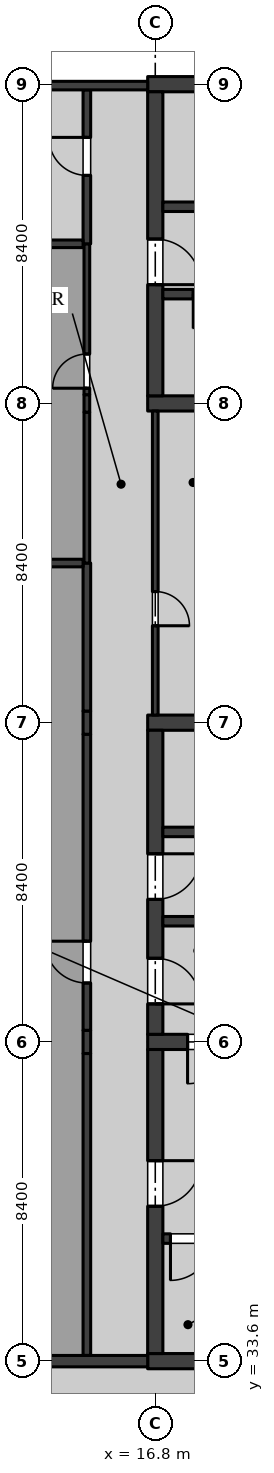
"""IFC4 building model, lengths in metres.
Left out: names, types, materials, properties, quantities, classifications, styles, units other than length and angle.
Written with IfcOpenShell. Run it as: python <this file> out.ifc"""

import sys

from ifc_helpers import new_model, si_unit, direction, frame, frame_2d, origin, place, context, subcontext, project, spatial, rectangle, extrude, element, fill, save


model = new_model("IFC4")
c1 = context("Model", 3, precision=1e-05, world=origin(), true_north=direction((0.0, 1.0)))
c2 = subcontext(c1, "Body", "Model", "MODEL_VIEW")
j1 = project(units=[si_unit("LENGTHUNIT", "METRE"), si_unit("PLANEANGLEUNIT", "RADIAN")], contexts=[c1])
p1 = place(None, origin())
s1 = spatial("IfcSite", under=j1, at=p1, CompositionType="ELEMENT")
p2 = place(p1, origin())
s2 = spatial("IfcBuilding", under=s1, at=p2, CompositionType="ELEMENT")
p3 = place(p2, frame((0.0, 0.0, 5.4)))
s3 = spatial("IfcBuildingStorey", under=s2, at=p3, CompositionType="ELEMENT", Elevation=5.4)
p4 = place(p3, frame((16.6, 42.0, 0.0), z_axis=(0.0, 0.0, 1.0), x_axis=(1.0, 0.0, 0.0)))
e1 = element("IfcWall", 1, at=p4, inside=s3, PredefinedType="SHEAR", context=c2, shape_type="SweptSolid", body=[
    extrude(rectangle(XDim=8.8, YDim=0.4, at=frame_2d((4.4, 0.0))), origin(), (0.0, 0.0, 1.0), 4.37),
])
p5 = place(p4, frame((1.05, 0.0, 0.0)))
e2 = element("IfcOpeningElement", 2, at=p5, cuts=e1, PredefinedType="OPENING", context=c2, shape_type="SweptSolid", body=[
    extrude(rectangle(XDim=1.1, YDim=2.1, at=frame_2d((0.55, 1.05))), frame((0.0, 0.21, 0.0), z_axis=(0.0, -1.0, 0.0), x_axis=(1.0, 0.0, 0.0)), (0.0, 0.0, 1.0), 0.42),
])
p6 = place(p3, frame((16.6, 50.4, 0.0), z_axis=(0.0, 0.0, 1.0), x_axis=(1.0, 0.0, 0.0)))
e3 = element("IfcWall", 3, at=p6, inside=s3, PredefinedType="SHEAR", context=c2, shape_type="SweptSolid", body=[
    extrude(rectangle(XDim=8.8, YDim=0.4, at=frame_2d((4.4, 0.0))), origin(), (0.0, 0.0, 1.0), 4.37),
])
p7 = place(p3, frame((16.8, 42.2, 0.0), z_axis=(0.0, 0.0, 1.0), x_axis=(0.0, 1.0, 0.0)))
e4 = element("IfcWall", 4, at=p7, inside=s3, PredefinedType="SHEAR", context=c2, shape_type="SweptSolid", body=[
    extrude(rectangle(XDim=8.0, YDim=0.4, at=frame_2d((4.0, 0.0))), origin(), (0.0, 0.0, 1.0), 4.37),
])
p8 = place(p7, frame((3.55, 0.0, 0.0)))
e5 = element("IfcOpeningElement", 5, at=p8, cuts=e4, PredefinedType="OPENING", context=c2, shape_type="SweptSolid", body=[
    extrude(rectangle(XDim=1.2, YDim=2.1, at=frame_2d((0.6, 1.05))), frame((0.0, 0.21, 0.0), z_axis=(0.0, -1.0, 0.0), x_axis=(1.0, 0.0, 0.0)), (0.0, 0.0, 1.0), 0.42),
])
p9 = place(p7, frame((0.8, 0.0, 0.0)))
e6 = element("IfcOpeningElement", 6, at=p9, cuts=e4, PredefinedType="OPENING", context=c2, shape_type="SweptSolid", body=[
    extrude(rectangle(XDim=1.2, YDim=2.1, at=frame_2d((0.6, 1.05))), frame((0.0, 0.21, 0.0), z_axis=(0.0, -1.0, 0.0), x_axis=(1.0, 0.0, 0.0)), (0.0, 0.0, 1.0), 0.42),
])
p10 = place(p3, frame((21.7, 47.525, 0.0), z_axis=(0.0, 0.0, 1.0), x_axis=(-1.0, 0.0, 0.0)))
e7 = element("IfcWall", 7, at=p10, inside=s3, PredefinedType="SOLIDWALL", context=c2, shape_type="SweptSolid", body=[
    extrude(rectangle(XDim=4.7, YDim=0.25, at=frame_2d((2.35, 0.0))), origin(), (0.0, 0.0, 1.0), 4.37),
])
p11 = place(p10, frame((1.9, 0.0, 0.0)))
e8 = element("IfcOpeningElement", 8, at=p11, cuts=e7, PredefinedType="OPENING", context=c2, shape_type="SweptSolid", body=[
    extrude(rectangle(XDim=0.9, YDim=2.1, at=frame_2d((0.45, 1.05))), frame((0.0, 0.135, 0.0), z_axis=(0.0, -1.0, 0.0), x_axis=(1.0, 0.0, 0.0)), (0.0, 0.0, 1.0), 0.27),
])
p12 = place(p3, frame((19.65, 45.175, 0.0), z_axis=(0.0, 0.0, 1.0), x_axis=(-1.0, 0.0, 0.0)))
e9 = element("IfcWall", 9, at=p12, inside=s3, PredefinedType="SOLIDWALL", context=c2, shape_type="SweptSolid", body=[
    extrude(rectangle(XDim=2.65, YDim=0.25, at=frame_2d((1.325, 0.0))), origin(), (0.0, 0.0, 1.0), 4.37),
])
for number, where, z_axis, x_axis in (
    (10, (16.6, 58.8, 0.0), (0.0, 0.0, 1.0), (1.0, 0.0, 0.0)),
    (11, (16.6, 67.2, 0.0), (0.0, 0.0, 1.0), (1.0, 0.0, 0.0)),
):
    element("IfcWall", number, at=place(p3, frame(where, z_axis=z_axis, x_axis=x_axis)), inside=s3, PredefinedType="SHEAR", context=c2, shape_type="SweptSolid", body=[
        extrude(rectangle(XDim=8.8, YDim=0.4, at=frame_2d((4.4, 0.0))), origin(), (0.0, 0.0, 1.0), 4.37),
    ])
p13 = place(p3, frame((16.8, 59.0, 0.0), z_axis=(0.0, 0.0, 1.0), x_axis=(0.0, 1.0, 0.0)))
e12 = element("IfcWall", 12, at=p13, inside=s3, PredefinedType="SHEAR", context=c2, shape_type="SweptSolid", body=[
    extrude(rectangle(XDim=8.0, YDim=0.4, at=frame_2d((4.0, 0.0))), origin(), (0.0, 0.0, 1.0), 4.37),
])
p14 = place(p13, frame((2.925, 0.0, 0.0)))
e13 = element("IfcOpeningElement", 13, at=p14, cuts=e12, PredefinedType="OPENING", context=c2, shape_type="SweptSolid", body=[
    extrude(rectangle(XDim=1.2, YDim=2.1, at=frame_2d((0.6, 1.05))), frame((0.0, 0.21, 0.0), z_axis=(0.0, -1.0, 0.0), x_axis=(1.0, 0.0, 0.0)), (0.0, 0.0, 1.0), 0.42),
])
p15 = place(p3, frame((25.0, 63.975, 0.0), z_axis=(0.0, 0.0, 1.0), x_axis=(-1.0, 0.0, 0.0)))
e14 = element("IfcWall", 14, at=p15, inside=s3, PredefinedType="SOLIDWALL", context=c2, shape_type="SweptSolid", body=[
    extrude(rectangle(XDim=8.0, YDim=0.25, at=frame_2d((4.0, 0.0))), origin(), (0.0, 0.0, 1.0), 4.37),
])
p16 = place(p15, frame((0.2, 0.0, 0.0)))
e15 = element("IfcOpeningElement", 15, at=p16, cuts=e14, PredefinedType="OPENING", context=c2, shape_type="SweptSolid", body=[
    extrude(rectangle(XDim=1.1, YDim=2.1, at=frame_2d((0.55, 1.05))), frame((0.0, 0.135, 0.0), z_axis=(0.0, -1.0, 0.0), x_axis=(1.0, 0.0, 0.0)), (0.0, 0.0, 1.0), 0.27),
])
p17 = place(p3, frame((22.35, 61.675, 0.0), z_axis=(0.0, 0.0, 1.0), x_axis=(-1.0, 0.0, 0.0)))
e16 = element("IfcWall", 16, at=p17, inside=s3, PredefinedType="SOLIDWALL", context=c2, shape_type="SweptSolid", body=[
    extrude(rectangle(XDim=5.35, YDim=0.25, at=frame_2d((2.675, 0.0))), origin(), (0.0, 0.0, 1.0), 4.37),
])
p18 = place(p17, frame((3.65, 0.0, 0.0)))
e17 = element("IfcOpeningElement", 17, at=p18, cuts=e16, PredefinedType="OPENING", context=c2, shape_type="SweptSolid", body=[
    extrude(rectangle(XDim=0.9, YDim=2.1, at=frame_2d((0.45, 1.05))), frame((0.0, 0.135, 0.0), z_axis=(0.0, -1.0, 0.0), x_axis=(1.0, 0.0, 0.0)), (0.0, 0.0, 1.0), 0.27),
])
p19 = place(p17, frame((0.9, 0.0, 0.0)))
e18 = element("IfcOpeningElement", 18, at=p19, cuts=e16, PredefinedType="OPENING", context=c2, shape_type="SweptSolid", body=[
    extrude(rectangle(XDim=0.8, YDim=2.1, at=frame_2d((0.4, 1.05))), frame((0.0, 0.135, 0.0), z_axis=(0.0, -1.0, 0.0), x_axis=(1.0, 0.0, 0.0)), (0.0, 0.0, 1.0), 0.27),
])
p20 = place(p3, frame((16.6, 33.6, 0.0), z_axis=(0.0, 0.0, 1.0), x_axis=(1.0, 0.0, 0.0)))
e19 = element("IfcWall", 19, at=p20, inside=s3, PredefinedType="SHEAR", context=c2, shape_type="SweptSolid", body=[
    extrude(rectangle(XDim=8.8, YDim=0.4, at=frame_2d((4.4, 0.0))), origin(), (0.0, 0.0, 1.0), 4.37),
])
p21 = place(p3, frame((16.8, 33.8, 0.0), z_axis=(0.0, 0.0, 1.0), x_axis=(0.0, 1.0, 0.0)))
e20 = element("IfcWall", 20, at=p21, inside=s3, PredefinedType="SHEAR", context=c2, shape_type="SweptSolid", body=[
    extrude(rectangle(XDim=8.0, YDim=0.4, at=frame_2d((4.0, 0.0))), origin(), (0.0, 0.0, 1.0), 4.37),
])
p22 = place(p21, frame((3.875, 0.0, 0.0)))
e21 = element("IfcOpeningElement", 21, at=p22, cuts=e20, PredefinedType="OPENING", context=c2, shape_type="SweptSolid", body=[
    extrude(rectangle(XDim=1.2, YDim=2.1, at=frame_2d((0.6, 1.05))), frame((0.0, 0.21, 0.0), z_axis=(0.0, -1.0, 0.0), x_axis=(1.0, 0.0, 0.0)), (0.0, 0.0, 1.0), 0.42),
])
p23 = place(p3, frame((17.0, 36.825, 0.0), z_axis=(0.0, 0.0, 1.0), x_axis=(1.0, 0.0, 0.0)))
e22 = element("IfcWall", 22, at=p23, inside=s3, PredefinedType="SOLIDWALL", context=c2, shape_type="SweptSolid", body=[
    extrude(rectangle(XDim=8.0, YDim=0.25, at=frame_2d((4.0, 0.0))), origin(), (0.0, 0.0, 1.0), 4.37),
])
p24 = place(p23, frame((0.2, 0.0, 0.0)))
e23 = element("IfcOpeningElement", 23, at=p24, cuts=e22, PredefinedType="OPENING", context=c2, shape_type="SweptSolid", body=[
    extrude(rectangle(XDim=1.1, YDim=2.1, at=frame_2d((0.55, 1.05))), frame((0.0, 0.135, 0.0), z_axis=(0.0, -1.0, 0.0), x_axis=(1.0, 0.0, 0.0)), (0.0, 0.0, 1.0), 0.27),
])
p25 = place(p3, frame((16.8, 50.6, 0.0), z_axis=(0.0, 0.0, 1.0), x_axis=(0.0, 1.0, 0.0)))
e24 = element("IfcWall", 24, at=p25, inside=s3, PredefinedType="PARTITIONING", context=c2, shape_type="SweptSolid", body=[
    extrude(rectangle(XDim=8.0, YDim=0.15, at=frame_2d((4.0, 0.0))), origin(), (0.0, 0.0, 1.0), 3.746),
])
p26 = place(p25, frame((2.35, 0.0, 0.0)))
e25 = element("IfcOpeningElement", 25, at=p26, cuts=e24, PredefinedType="OPENING", context=c2, shape_type="SweptSolid", body=[
    extrude(rectangle(XDim=0.9, YDim=2.1, at=frame_2d((0.45, 1.05))), frame((0.0, 0.085, 0.0), z_axis=(0.0, -1.0, 0.0), x_axis=(1.0, 0.0, 0.0)), (0.0, 0.0, 1.0), 0.17),
])
p27 = place(p3, frame((15.0, 33.75, 0.0), z_axis=(0.0, 0.0, 1.0), x_axis=(0.0, 1.0, 0.0)))
e26 = element("IfcWall", 26, at=p27, inside=s3, PredefinedType="PARTITIONING", context=c2, shape_type="SweptSolid", body=[
    extrude(rectangle(XDim=7.945, YDim=0.2, at=frame_2d((3.973, 0.0))), origin(), (0.0, 0.0, 1.0), 4.37),
])
p28 = place(p3, frame((15.0, 41.695, 0.0), z_axis=(0.0, 0.0, 1.0), x_axis=(0.0, 1.0, 0.0)))
e27 = element("IfcWall", 27, at=p28, inside=s3, PredefinedType="PARTITIONING", context=c2, shape_type="SweptSolid", body=[
    extrude(rectangle(XDim=0.61, YDim=0.2, at=frame_2d((0.305, 0.0))), origin(), (0.0, 0.0, 1.0), 3.746),
])
p29 = place(p3, frame((15.0, 42.305, 0.0), z_axis=(0.0, 0.0, 1.0), x_axis=(0.0, 1.0, 0.0)))
e28 = element("IfcWall", 28, at=p29, inside=s3, PredefinedType="PARTITIONING", context=c2, shape_type="SweptSolid", body=[
    extrude(rectangle(XDim=7.79, YDim=0.2, at=frame_2d((3.895, 0.0))), origin(), (0.0, 0.0, 1.0), 4.37),
])
p30 = place(p29, frame((1.245, 0.0, 0.0)))
e29 = element("IfcOpeningElement", 29, at=p30, cuts=e28, PredefinedType="OPENING", context=c2, shape_type="SweptSolid", body=[
    extrude(rectangle(XDim=1.1, YDim=2.1, at=frame_2d((0.55, 1.05))), frame((0.0, 0.11, 0.0), z_axis=(0.0, -1.0, 0.0), x_axis=(1.0, 0.0, 0.0)), (0.0, 0.0, 1.0), 0.22),
])
p31 = place(p3, frame((15.0, 50.095, 0.0), z_axis=(0.0, 0.0, 1.0), x_axis=(0.0, 1.0, 0.0)))
e30 = element("IfcWall", 30, at=p31, inside=s3, PredefinedType="PARTITIONING", context=c2, shape_type="SweptSolid", body=[
    extrude(rectangle(XDim=0.61, YDim=0.2, at=frame_2d((0.305, 0.0))), origin(), (0.0, 0.0, 1.0), 3.746),
])
p32 = place(p3, frame((15.0, 50.705, 0.0), z_axis=(0.0, 0.0, 1.0), x_axis=(0.0, 1.0, 0.0)))
e31 = element("IfcWall", 31, at=p32, inside=s3, PredefinedType="PARTITIONING", context=c2, shape_type="SweptSolid", body=[
    extrude(rectangle(XDim=3.895, YDim=0.2, at=frame_2d((1.948, 0.0))), origin(), (0.0, 0.0, 1.0), 4.37),
])
p33 = place(p3, frame((15.0, 54.6, 0.0), z_axis=(0.0, 0.0, 1.0), x_axis=(0.0, 1.0, 0.0)))
e32 = element("IfcWall", 32, at=p33, inside=s3, PredefinedType="PARTITIONING", context=c2, shape_type="SweptSolid", body=[
    extrude(rectangle(XDim=3.97, YDim=0.15, at=frame_2d((1.985, 0.0))), origin(), (0.0, 0.0, 1.0), 4.37),
])
p34 = place(p3, frame((15.0, 58.57, 0.0), z_axis=(0.0, 0.0, 1.0), x_axis=(0.0, 1.0, 0.0)))
e33 = element("IfcWall", 33, at=p34, inside=s3, PredefinedType="PARTITIONING", context=c2, shape_type="SweptSolid", body=[
    extrude(rectangle(XDim=0.46, YDim=0.15, at=frame_2d((0.23, 0.0))), origin(), (0.0, 0.0, 1.0), 3.746),
])
p35 = place(p3, frame((15.0, 59.03, 0.0), z_axis=(0.0, 0.0, 1.0), x_axis=(0.0, 1.0, 0.0)))
e34 = element("IfcWall", 34, at=p35, inside=s3, PredefinedType="PARTITIONING", context=c2, shape_type="SweptSolid", body=[
    extrude(rectangle(XDim=3.97, YDim=0.15, at=frame_2d((1.985, 0.0))), origin(), (0.0, 0.0, 1.0), 4.37),
])
p36 = place(p35, frame((0.17, 0.0, 0.0)))
e35 = element("IfcOpeningElement", 35, at=p36, cuts=e34, PredefinedType="OPENING", context=c2, shape_type="SweptSolid", body=[
    extrude(rectangle(XDim=0.9, YDim=2.1, at=frame_2d((0.45, 1.05))), frame((0.0, 0.085, 0.0), z_axis=(0.0, -1.0, 0.0), x_axis=(1.0, 0.0, 0.0)), (0.0, 0.0, 1.0), 0.17),
])
p37 = place(p3, frame((15.0, 63.0, 0.0), z_axis=(0.0, 0.0, 1.0), x_axis=(0.0, 1.0, 0.0)))
e36 = element("IfcWall", 36, at=p37, inside=s3, PredefinedType="PARTITIONING", context=c2, shape_type="SweptSolid", body=[
    extrude(rectangle(XDim=4.05, YDim=0.2, at=frame_2d((2.025, 0.0))), origin(), (0.0, 0.0, 1.0), 4.37),
])
p38 = place(p37, frame((1.8, 0.0, 0.0)))
e37 = element("IfcOpeningElement", 37, at=p38, cuts=e36, PredefinedType="OPENING", context=c2, shape_type="SweptSolid", body=[
    extrude(rectangle(XDim=1.0, YDim=2.1, at=frame_2d((0.5, 1.05))), frame((0.0, 0.11, 0.0), z_axis=(0.0, -1.0, 0.0), x_axis=(1.0, 0.0, 0.0)), (0.0, 0.0, 1.0), 0.22),
])
for number, where, z_axis, x_axis in (
    (38, (13.695, 54.6, 0.0), (0.0, 0.0, 1.0), (1.0, 0.0, 0.0)),
    (39, (13.695, 63.0, 0.0), (0.0, 0.0, 1.0), (1.0, 0.0, 0.0)),
):
    element("IfcWall", number, at=place(p3, frame(where, z_axis=z_axis, x_axis=x_axis)), inside=s3, PredefinedType="PARTITIONING", context=c2, shape_type="SweptSolid", body=[
        extrude(rectangle(XDim=1.205, YDim=0.2, at=frame_2d((0.603, 0.0))), origin(), (0.0, 0.0, 1.0), 3.895),
    ])
p39 = place(p3, frame((16.6, 67.163, 0.0), z_axis=(0.0, 0.0, 1.0), x_axis=(-1.0, 0.0, 0.0)))
e40 = element("IfcWall", 40, at=p39, inside=s3, PredefinedType="SOLIDWALL", context=c2, shape_type="SweptSolid", body=[
    extrude(rectangle(XDim=7.82, YDim=0.225, at=frame_2d((3.91, 0.0))), origin(), (0.0, 0.0, 1.0), 3.746),
])
p40 = place(p39, frame((5.2, 0.0, 1.5)))
e41 = element("IfcOpeningElement", 41, at=p40, cuts=e40, PredefinedType="OPENING", context=c2, shape_type="SweptSolid", body=[
    extrude(rectangle(XDim=1.8, YDim=0.6, at=frame_2d((0.9, 0.3))), frame((0.0, 0.123, 0.0), z_axis=(0.0, -1.0, 0.0), x_axis=(1.0, 0.0, 0.0)), (0.0, 0.0, 1.0), 0.245),
])
p41 = place(p3, frame((16.6, 33.6, 0.0), z_axis=(0.0, 0.0, 1.0), x_axis=(-1.0, 0.0, 0.0)))
e42 = element("IfcWall", 42, at=p41, inside=s3, PredefinedType="SOLIDWALL", context=c2, shape_type="SweptSolid", body=[
    extrude(rectangle(XDim=7.82, YDim=0.3, at=frame_2d((3.91, 0.0))), origin(), (0.0, 0.0, 1.0), 3.746),
])
p42 = place(p8, frame((1.2, 0.0, 0.0), z_axis=(0.0, 0.0, 1.0), x_axis=(-1.0, 0.0, 0.0)))
e43 = element("IfcDoor", 43, at=p42, inside=s3, OperationType="SINGLE_SWING_RIGHT", PredefinedType="DOOR", context=c2, shape_type="SweptSolid", body=[
    extrude(rectangle(XDim=1.2, YDim=2.1, at=frame_2d((0.6, 1.05))), frame((0.0, 0.035, 0.0), z_axis=(0.0, -1.0, 0.0), x_axis=(1.0, 0.0, 0.0)), (0.0, 0.0, 1.0), 0.07),
])
fill(e5, e43)
p43 = place(p9, frame((1.2, 0.0, 0.0), z_axis=(0.0, 0.0, 1.0), x_axis=(-1.0, 0.0, 0.0)))
e44 = element("IfcDoor", 44, at=p43, inside=s3, OperationType="SINGLE_SWING_LEFT", PredefinedType="DOOR", context=c2, shape_type="SweptSolid", body=[
    extrude(rectangle(XDim=1.2, YDim=2.1, at=frame_2d((0.6, 1.05))), frame((0.0, 0.035, 0.0), z_axis=(0.0, -1.0, 0.0), x_axis=(1.0, 0.0, 0.0)), (0.0, 0.0, 1.0), 0.07),
])
fill(e6, e44)
p44 = place(p5, frame((1.1, 0.0, 0.0), z_axis=(0.0, 0.0, 1.0), x_axis=(-1.0, 0.0, 0.0)))
e45 = element("IfcDoor", 45, at=p44, inside=s3, OperationType="SINGLE_SWING_LEFT", PredefinedType="DOOR", context=c2, shape_type="SweptSolid", body=[
    extrude(rectangle(XDim=1.1, YDim=2.1, at=frame_2d((0.55, 1.05))), frame((0.0, 0.035, 0.0), z_axis=(0.0, -1.0, 0.0), x_axis=(1.0, 0.0, 0.0)), (0.0, 0.0, 1.0), 0.07),
])
fill(e2, e45)
p45 = place(p14, frame((1.2, 0.0, 0.0), z_axis=(0.0, 0.0, 1.0), x_axis=(-1.0, 0.0, 0.0)))
e46 = element("IfcDoor", 46, at=p45, inside=s3, OperationType="SINGLE_SWING_LEFT", PredefinedType="DOOR", context=c2, shape_type="SweptSolid", body=[
    extrude(rectangle(XDim=1.2, YDim=2.1, at=frame_2d((0.6, 1.05))), frame((0.0, 0.035, 0.0), z_axis=(0.0, -1.0, 0.0), x_axis=(1.0, 0.0, 0.0)), (0.0, 0.0, 1.0), 0.07),
])
fill(e13, e46)
p46 = place(p22, frame((1.2, 0.0, 0.0), z_axis=(0.0, 0.0, 1.0), x_axis=(-1.0, 0.0, 0.0)))
e47 = element("IfcDoor", 47, at=p46, inside=s3, OperationType="SINGLE_SWING_RIGHT", PredefinedType="DOOR", context=c2, shape_type="SweptSolid", body=[
    extrude(rectangle(XDim=1.2, YDim=2.1, at=frame_2d((0.6, 1.05))), frame((0.0, 0.035, 0.0), z_axis=(0.0, -1.0, 0.0), x_axis=(1.0, 0.0, 0.0)), (0.0, 0.0, 1.0), 0.07),
])
fill(e21, e47)
p47 = place(p24, frame((1.1, 0.0, 0.0), z_axis=(0.0, 0.0, 1.0), x_axis=(-1.0, 0.0, 0.0)))
e48 = element("IfcDoor", 48, at=p47, inside=s3, OperationType="SINGLE_SWING_LEFT", PredefinedType="DOOR", context=c2, shape_type="SweptSolid", body=[
    extrude(rectangle(XDim=1.1, YDim=2.1, at=frame_2d((0.55, 1.05))), frame((0.0, 0.035, 0.0), z_axis=(0.0, -1.0, 0.0), x_axis=(1.0, 0.0, 0.0)), (0.0, 0.0, 1.0), 0.07),
])
fill(e23, e48)
p48 = place(p26, frame((0.9, 0.0, 0.0), z_axis=(0.0, 0.0, 1.0), x_axis=(-1.0, 0.0, 0.0)))
e49 = element("IfcDoor", 49, at=p48, inside=s3, OperationType="SINGLE_SWING_LEFT", PredefinedType="DOOR", context=c2, shape_type="SweptSolid", body=[
    extrude(rectangle(XDim=0.9, YDim=2.1, at=frame_2d((0.45, 1.05))), frame((0.0, 0.025, 0.0), z_axis=(0.0, -1.0, 0.0), x_axis=(1.0, 0.0, 0.0)), (0.0, 0.0, 1.0), 0.05),
])
fill(e25, e49)
p49 = place(p30, origin())
e50 = element("IfcDoor", 50, at=p49, inside=s3, OperationType="SINGLE_SWING_LEFT", PredefinedType="DOOR", context=c2, shape_type="SweptSolid", body=[
    extrude(rectangle(XDim=1.1, YDim=2.1, at=frame_2d((0.55, 1.05))), frame((0.0, 0.025, 0.0), z_axis=(0.0, -1.0, 0.0), x_axis=(1.0, 0.0, 0.0)), (0.0, 0.0, 1.0), 0.05),
])
fill(e29, e50)
p50 = place(p36, origin())
e51 = element("IfcDoor", 51, at=p50, inside=s3, OperationType="SINGLE_SWING_RIGHT", PredefinedType="DOOR", context=c2, shape_type="SweptSolid", body=[
    extrude(rectangle(XDim=0.9, YDim=2.1, at=frame_2d((0.45, 1.05))), frame((0.0, 0.025, 0.0), z_axis=(0.0, -1.0, 0.0), x_axis=(1.0, 0.0, 0.0)), (0.0, 0.0, 1.0), 0.05),
])
fill(e35, e51)
p51 = place(p38, origin())
e52 = element("IfcDoor", 52, at=p51, inside=s3, OperationType="SINGLE_SWING_LEFT", PredefinedType="DOOR", context=c2, shape_type="SweptSolid", body=[
    extrude(rectangle(XDim=1.0, YDim=2.1, at=frame_2d((0.5, 1.05))), frame((0.0, 0.025, 0.0), z_axis=(0.0, -1.0, 0.0), x_axis=(1.0, 0.0, 0.0)), (0.0, 0.0, 1.0), 0.05),
])
fill(e37, e52)
save(model, sys.argv[1])
